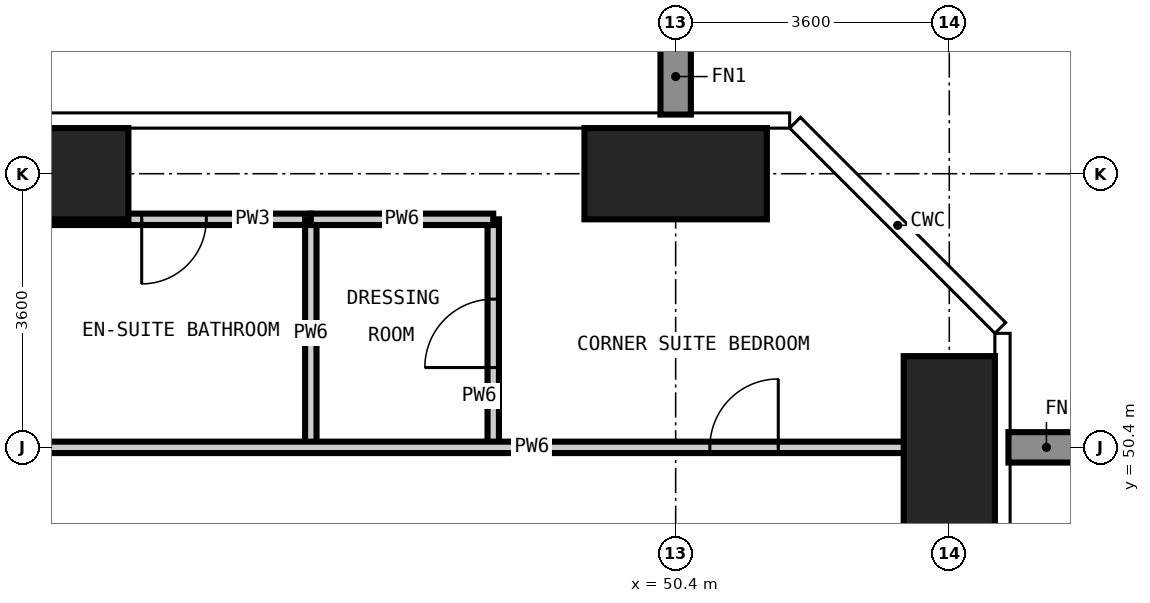
"""IFC4 building model, lengths in metres.
Left out: names, types, materials, properties, quantities, classifications, styles, units other than length and angle.
Written with IfcOpenShell. Run it as: python <this file> out.ifc"""

import sys

from ifc_helpers import new_model, si_unit, direction, frame, frame_2d, origin, origin_2d, place, context, subcontext, project, spatial, rectangle, extrude, element, fill, save


model = new_model("IFC4")
c1 = context("Model", 3, precision=1e-05, world=origin(), true_north=direction((0.0, 1.0)))
c2 = subcontext(c1, "Body", "Model", "MODEL_VIEW")
j1 = project(units=[si_unit("LENGTHUNIT", "METRE"), si_unit("PLANEANGLEUNIT", "RADIAN")], contexts=[c1])
p1 = place(None, origin())
s1 = spatial("IfcSite", under=j1, at=p1, CompositionType="ELEMENT")
p2 = place(p1, origin())
s2 = spatial("IfcBuilding", under=s1, at=p2, CompositionType="ELEMENT")
p3 = place(p2, frame((0.0, 0.0, 187.8)))
s3 = spatial("IfcBuildingStorey", under=s2, at=p3, CompositionType="ELEMENT", Elevation=187.8)
for number, where, z_axis, x_axis in (
    (1, (42.0, 54.0, -0.35), (0.0, 0.0, 1.0), (1.0, 0.0, 0.0)),
    (2, (50.4, 54.0, -0.35), (0.0, 0.0, 1.0), (1.0, 0.0, 0.0)),
):
    element("IfcColumn", number, at=place(p3, frame(where, z_axis=z_axis, x_axis=x_axis)), inside=s3, PredefinedType="COLUMN", context=c2, shape_type="SweptSolid", body=[
        extrude(rectangle(XDim=2.4, YDim=1.2, at=origin_2d()), origin(), (0.0, 0.0, 1.0), 3.6),
    ])
p4 = place(p3, frame((54.0, 50.4, -0.35), z_axis=(0.0, 0.0, 1.0), x_axis=(1.0, 0.0, 0.0)))
e3 = element("IfcColumn", 3, at=p4, inside=s3, PredefinedType="COLUMN", context=c2, shape_type="SweptSolid", body=[
    extrude(rectangle(XDim=1.2, YDim=2.4, at=origin_2d()), origin(), (0.0, 0.0, 1.0), 3.6),
])
p5 = place(p3, frame((42.0, 53.4, 0.0), z_axis=(0.0, 0.0, 1.0), x_axis=(1.0, 0.0, 0.0)))
e4 = element("IfcWall", 4, at=p5, inside=s3, PredefinedType="PARTITIONING", context=c2, shape_type="SweptSolid", body=[
    extrude(rectangle(XDim=3.6, YDim=0.15, at=frame_2d((1.8, 0.0))), origin(), (0.0, 0.0, 1.0), 3.25),
])
p6 = place(p5, frame((1.375, 0.0, 0.0)))
e5 = element("IfcOpeningElement", 5, at=p6, cuts=e4, PredefinedType="OPENING", context=c2, shape_type="SweptSolid", body=[
    extrude(rectangle(XDim=0.85, YDim=2.1, at=frame_2d((0.425, 1.05))), frame((0.0, 0.085, 0.0), z_axis=(0.0, -1.0, 0.0), x_axis=(1.0, 0.0, 0.0)), (0.0, 0.0, 1.0), 0.17),
])
p7 = place(p3, frame((45.6, 50.4, 0.0), z_axis=(0.0, 0.0, 1.0), x_axis=(0.0, 1.0, 0.0)))
e6 = element("IfcWall", 6, at=p7, inside=s3, PredefinedType="PARTITIONING", context=c2, shape_type="SweptSolid", body=[
    extrude(rectangle(XDim=3.0, YDim=0.15, at=frame_2d((1.5, 0.0))), origin(), (0.0, 0.0, 1.0), 3.25),
])
p8 = place(p3, frame((48.0, 50.4, 0.0), z_axis=(0.0, 0.0, 1.0), x_axis=(0.0, 1.0, 0.0)))
e7 = element("IfcWall", 7, at=p8, inside=s3, PredefinedType="PARTITIONING", context=c2, shape_type="SweptSolid", body=[
    extrude(rectangle(XDim=3.0, YDim=0.15, at=frame_2d((1.5, 0.0))), origin(), (0.0, 0.0, 1.0), 3.25),
])
p9 = place(p8, frame((1.05, 0.0, 0.0)))
e8 = element("IfcOpeningElement", 8, at=p9, cuts=e7, PredefinedType="OPENING", context=c2, shape_type="SweptSolid", body=[
    extrude(rectangle(XDim=0.9, YDim=2.1, at=frame_2d((0.45, 1.05))), frame((0.0, 0.085, 0.0), z_axis=(0.0, -1.0, 0.0), x_axis=(1.0, 0.0, 0.0)), (0.0, 0.0, 1.0), 0.17),
])
p10 = place(p3, frame((42.0, 50.4, 0.0), z_axis=(0.0, 0.0, 1.0), x_axis=(1.0, 0.0, 0.0)))
e9 = element("IfcWall", 9, at=p10, inside=s3, PredefinedType="PARTITIONING", context=c2, shape_type="SweptSolid", body=[
    extrude(rectangle(XDim=12.618, YDim=0.15, at=frame_2d((6.309, 0.0))), origin(), (0.0, 0.0, 1.0), 3.25),
])
p11 = place(p10, frame((8.85, 0.0, 0.0)))
e10 = element("IfcOpeningElement", 10, at=p11, cuts=e9, PredefinedType="OPENING", context=c2, shape_type="SweptSolid", body=[
    extrude(rectangle(XDim=0.9, YDim=2.1, at=frame_2d((0.45, 1.05))), frame((0.0, 0.085, 0.0), z_axis=(0.0, -1.0, 0.0), x_axis=(1.0, 0.0, 0.0)), (0.0, 0.0, 1.0), 0.17),
])
p12 = place(p3, frame((45.6, 53.4, 0.0), z_axis=(0.0, 0.0, 1.0), x_axis=(1.0, 0.0, 0.0)))
e11 = element("IfcWall", 11, at=p12, inside=s3, PredefinedType="PARTITIONING", context=c2, shape_type="SweptSolid", body=[
    extrude(rectangle(XDim=2.4, YDim=0.15, at=frame_2d((1.2, 0.0))), origin(), (0.0, 0.0, 1.0), 3.25),
])
p13 = place(p11, origin())
e12 = element("IfcDoor", 12, at=p13, inside=s3, OperationType="SINGLE_SWING_RIGHT", PredefinedType="DOOR", context=c2, shape_type="SweptSolid", body=[
    extrude(rectangle(XDim=0.9, YDim=2.1, at=frame_2d((0.45, 1.05))), frame((0.0, 0.025, 0.0), z_axis=(0.0, -1.0, 0.0), x_axis=(1.0, 0.0, 0.0)), (0.0, 0.0, 1.0), 0.05),
])
fill(e10, e12)
p14 = place(p6, frame((0.85, 0.0, 0.0), z_axis=(0.0, 0.0, 1.0), x_axis=(-1.0, 0.0, 0.0)))
e13 = element("IfcDoor", 13, at=p14, inside=s3, OperationType="SINGLE_SWING_RIGHT", PredefinedType="DOOR", context=c2, shape_type="SweptSolid", body=[
    extrude(rectangle(XDim=0.85, YDim=2.1, at=frame_2d((0.425, 1.05))), frame((0.0, 0.025, 0.0), z_axis=(0.0, -1.0, 0.0), x_axis=(1.0, 0.0, 0.0)), (0.0, 0.0, 1.0), 0.05),
])
fill(e5, e13)
p15 = place(p9, origin())
e14 = element("IfcDoor", 14, at=p15, inside=s3, OperationType="SINGLE_SWING_LEFT", PredefinedType="DOOR", context=c2, shape_type="SweptSolid", body=[
    extrude(rectangle(XDim=0.9, YDim=2.1, at=frame_2d((0.45, 1.05))), frame((0.0, 0.025, 0.0), z_axis=(0.0, -1.0, 0.0), x_axis=(1.0, 0.0, 0.0)), (0.0, 0.0, 1.0), 0.05),
])
fill(e8, e14)
save(model, sys.argv[1])
